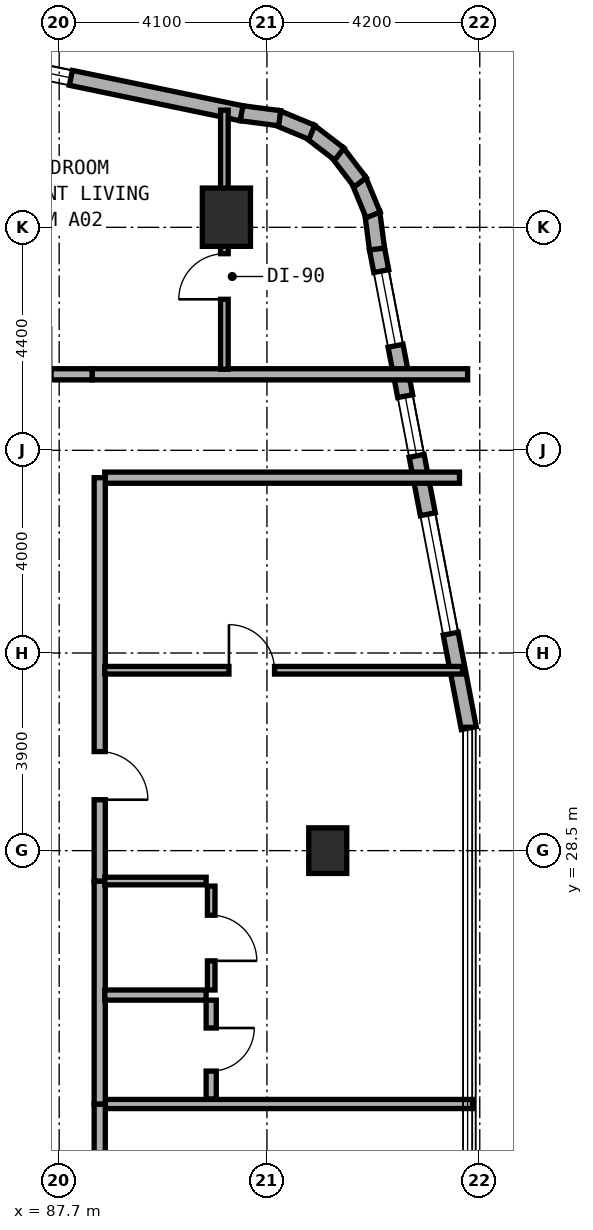
"""IFC4 building model, lengths in metres.
Left out: names, types, materials, properties, quantities, classifications, styles, units other than length and angle.
Written with IfcOpenShell. Run it as: python <this file> out.ifc"""

import sys

from ifc_helpers import new_model, si_unit, direction, frame, frame_2d, origin, origin_2d, place, context, subcontext, project, spatial, rectangle, extrude, element, fill, save


model = new_model("IFC4")
c1 = context("Model", 3, precision=1e-05, world=origin(), true_north=direction((0.0, 1.0)))
c2 = subcontext(c1, "Body", "Model", "MODEL_VIEW")
j1 = project(units=[si_unit("LENGTHUNIT", "METRE"), si_unit("PLANEANGLEUNIT", "RADIAN")], contexts=[c1])
p1 = place(None, origin())
s1 = spatial("IfcSite", under=j1, at=p1, CompositionType="ELEMENT")
p2 = place(p1, origin())
s2 = spatial("IfcBuilding", under=s1, at=p2, CompositionType="ELEMENT")
p3 = place(p2, frame((0.0, 0.0, 69.5)))
s3 = spatial("IfcBuildingStorey", under=s2, at=p3, CompositionType="ELEMENT", Elevation=69.5)
p4 = place(p3, frame((93.0, 28.5, 0.0), z_axis=(0.0, 0.0, 1.0), x_axis=(1.0, 0.0, 0.0)))
e1 = element("IfcColumn", 1, at=p4, inside=s3, PredefinedType="COLUMN", context=c2, shape_type="SweptSolid", body=[
    extrude(rectangle(XDim=0.75, YDim=0.9, at=origin_2d()), origin(), (0.0, 0.0, 1.0), 3.5),
])
p5 = place(p3, frame((91.0, 41.0, 0.0), z_axis=(0.0, 0.0, 1.0), x_axis=(1.0, 0.0, 0.0)))
e2 = element("IfcColumn", 2, at=p5, inside=s3, PredefinedType="COLUMN", context=c2, shape_type="SweptSolid", body=[
    extrude(rectangle(XDim=0.95, YDim=1.15, at=origin_2d()), origin(), (0.0, 0.0, 1.0), 3.5),
])
p6 = place(p3, frame((95.783, 30.918, 0.0), z_axis=(0.0, 0.0, 1.0), x_axis=(-0.188087874316, 0.982152203854, 0.0)))
e3 = element("IfcWall", 3, at=p6, inside=s3, PredefinedType="STANDARD", context=c2, shape_type="SweptSolid", body=[
    extrude(rectangle(XDim=9.634, YDim=0.3, at=frame_2d((4.817, 0.0))), origin(), (0.0, 0.0, 1.0), 3.25),
])
p7 = place(p6, frame((1.897, 0.0, 0.8)))
e4 = element("IfcOpeningElement", 4, at=p7, cuts=e3, PredefinedType="OPENING", context=c2, shape_type="SweptSolid", body=[
    extrude(rectangle(XDim=2.4, YDim=1.6, at=frame_2d((1.2, 0.8))), frame((0.0, 0.16, 0.0), z_axis=(0.0, -1.0, 0.0), x_axis=(1.0, 0.0, 0.0)), (0.0, 0.0, 1.0), 0.32),
])
p8 = place(p6, frame((5.47, 0.0, 0.85)))
e5 = element("IfcOpeningElement", 5, at=p8, cuts=e3, PredefinedType="OPENING", context=c2, shape_type="SweptSolid", body=[
    extrude(rectangle(XDim=1.2, YDim=1.5, at=frame_2d((0.6, 0.75))), frame((0.0, 0.16, 0.0), z_axis=(0.0, -1.0, 0.0), x_axis=(1.0, 0.0, 0.0)), (0.0, 0.0, 1.0), 0.32),
])
p9 = place(p6, frame((7.682, 0.0, 0.85)))
e6 = element("IfcOpeningElement", 6, at=p9, cuts=e3, PredefinedType="OPENING", context=c2, shape_type="SweptSolid", body=[
    extrude(rectangle(XDim=1.5, YDim=1.5, at=frame_2d((0.75, 0.75))), frame((0.0, 0.16, 0.0), z_axis=(0.0, -1.0, 0.0), x_axis=(1.0, 0.0, 0.0)), (0.0, 0.0, 1.0), 0.32),
])
p10 = place(p3, frame((93.972, 40.373, 0.0), z_axis=(0.0, 0.0, 1.0), x_axis=(-0.130255288807, 0.991480488834, 0.0)))
e7 = element("IfcWall", 7, at=p10, inside=s3, PredefinedType="STANDARD", context=c2, shape_type="SweptSolid", body=[
    extrude(rectangle(XDim=0.729, YDim=0.3, at=frame_2d((0.365, 0.0))), origin(), (0.0, 0.0, 1.0), 3.25),
])
p11 = place(p3, frame((93.896, 41.045, 0.0), z_axis=(0.0, 0.0, 1.0), x_axis=(-0.383267045233, 0.923637576129, 0.0)))
e8 = element("IfcWall", 8, at=p11, inside=s3, PredefinedType="STANDARD", context=c2, shape_type="SweptSolid", body=[
    extrude(rectangle(XDim=0.746, YDim=0.3, at=frame_2d((0.373, 0.0))), origin(), (0.0, 0.0, 1.0), 3.25),
])
for number, where, z_axis, x_axis in (
    (9, (93.641, 41.689, 0.0), (0.0, 0.0, 1.0), (-0.609, 0.793, 0.0)),
    (10, (93.229, 42.246, 0.0), (0.0, 0.0, 1.0), (-0.794, 0.608, 0.0)),
):
    element("IfcWall", number, at=place(p3, frame(where, z_axis=z_axis, x_axis=x_axis)), inside=s3, PredefinedType="STANDARD", context=c2, shape_type="SweptSolid", body=[
        extrude(rectangle(XDim=0.746, YDim=0.3, at=frame_2d((0.373, 0.0))), origin(), (0.0, 0.0, 1.0), 3.25),
    ])
p12 = place(p3, frame((92.686, 42.676, 0.0), z_axis=(0.0, 0.0, 1.0), x_axis=(-0.923637576129, 0.383267045233, 0.0)))
e11 = element("IfcWall", 11, at=p12, inside=s3, PredefinedType="STANDARD", context=c2, shape_type="SweptSolid", body=[
    extrude(rectangle(XDim=0.746, YDim=0.3, at=frame_2d((0.373, 0.0))), origin(), (0.0, 0.0, 1.0), 3.25),
])
p13 = place(p3, frame((92.051, 42.953, 0.0), z_axis=(0.0, 0.0, 1.0), x_axis=(-0.991559404866, 0.129653178221, 0.0)))
e12 = element("IfcWall", 12, at=p13, inside=s3, PredefinedType="STANDARD", context=c2, shape_type="SweptSolid", body=[
    extrude(rectangle(XDim=0.764, YDim=0.3, at=frame_2d((0.382, 0.0))), origin(), (0.0, 0.0, 1.0), 3.25),
])
p14 = place(p3, frame((91.298, 43.051, 0.0), z_axis=(0.0, 0.0, 1.0), x_axis=(-0.979120793441, 0.203279295189, 0.0)))
e13 = element("IfcWall", 13, at=p14, inside=s3, PredefinedType="STANDARD", context=c2, shape_type="SweptSolid", body=[
    extrude(rectangle(XDim=8.855, YDim=0.3, at=frame_2d((4.427, 0.0))), origin(), (0.0, 0.0, 1.0), 3.25),
])
p15 = place(p14, frame((3.439, 0.0, 0.8)))
e14 = element("IfcOpeningElement", 14, at=p15, cuts=e13, PredefinedType="OPENING", context=c2, shape_type="SweptSolid", body=[
    extrude(rectangle(XDim=2.4, YDim=1.6, at=frame_2d((1.2, 0.8))), frame((0.0, 0.16, 0.0), z_axis=(0.0, -1.0, 0.0), x_axis=(1.0, 0.0, 0.0)), (0.0, 0.0, 1.0), 0.32),
])
p16 = place(p3, frame((88.35, 37.9, 0.0), z_axis=(0.0, 0.0, 1.0), x_axis=(1.0, 0.0, 0.0)))
e15 = element("IfcWall", 15, at=p16, inside=s3, PredefinedType="SOLIDWALL", context=c2, shape_type="SweptSolid", body=[
    extrude(rectangle(XDim=7.41, YDim=0.22, at=frame_2d((3.705, 0.0))), origin(), (0.0, 0.0, 1.0), 2.865),
])
p17 = place(p3, frame((85.78, 37.9, 0.0), z_axis=(0.0, 0.0, 1.0), x_axis=(1.0, 0.0, 0.0)))
e16 = element("IfcWall", 16, at=p17, inside=s3, PredefinedType="SOLIDWALL", context=c2, shape_type="SweptSolid", body=[
    extrude(rectangle(XDim=2.57, YDim=0.22, at=frame_2d((1.285, 0.0))), origin(), (0.0, 0.0, 1.0), 3.22),
])
p18 = place(p17, frame((0.81, 0.0, 0.0)))
e17 = element("IfcOpeningElement", 17, at=p18, cuts=e16, PredefinedType="OPENING", context=c2, shape_type="SweptSolid", body=[
    extrude(rectangle(XDim=0.95, YDim=2.1, at=frame_2d((0.475, 1.05))), frame((0.0, 0.12, 0.0), z_axis=(0.0, -1.0, 0.0), x_axis=(1.0, 0.0, 0.0)), (0.0, 0.0, 1.0), 0.24),
])
p19 = place(p3, frame((90.96, 38.0, 0.0), z_axis=(0.0, 0.0, 1.0), x_axis=(0.0, 1.0, 0.0)))
e18 = element("IfcWall", 18, at=p19, inside=s3, PredefinedType="PARTITIONING", context=c2, shape_type="SweptSolid", body=[
    extrude(rectangle(XDim=5.113, YDim=0.15, at=frame_2d((2.557, 0.0))), origin(), (0.0, 0.0, 1.0), 2.865),
])
p20 = place(p19, frame((1.38, 0.0, 0.0)))
e19 = element("IfcOpeningElement", 19, at=p20, cuts=e18, PredefinedType="OPENING", context=c2, shape_type="SweptSolid", body=[
    extrude(rectangle(XDim=0.9, YDim=2.1, at=frame_2d((0.45, 1.05))), frame((0.0, 0.085, 0.0), z_axis=(0.0, -1.0, 0.0), x_axis=(1.0, 0.0, 0.0)), (0.0, 0.0, 1.0), 0.17),
])
p21 = place(p3, frame((88.6, 35.86, 0.0), z_axis=(0.0, 0.0, 1.0), x_axis=(1.0, 0.0, 0.0)))
e20 = element("IfcWall", 20, at=p21, inside=s3, PredefinedType="SOLIDWALL", context=c2, shape_type="SweptSolid", body=[
    extrude(rectangle(XDim=7.0, YDim=0.22, at=frame_2d((3.5, 0.0))), origin(), (0.0, 0.0, 1.0), 2.865),
])
p22 = place(p3, frame((88.5, 23.5, 0.0), z_axis=(0.0, 0.0, 1.0), x_axis=(1.0, 0.0, 0.0)))
e21 = element("IfcWall", 21, at=p22, inside=s3, PredefinedType="SOLIDWALL", context=c2, shape_type="SweptSolid", body=[
    extrude(rectangle(XDim=7.36, YDim=0.18, at=frame_2d((3.68, 0.0))), origin(), (0.0, 0.0, 1.0), 2.865),
])
p23 = place(p3, frame((88.5, 18.54, 0.0), z_axis=(0.0, 0.0, 1.0), x_axis=(0.0, 1.0, 0.0)))
e22 = element("IfcWall", 22, at=p23, inside=s3, PredefinedType="SOLIDWALL", context=c2, shape_type="SweptSolid", body=[
    extrude(rectangle(XDim=4.96, YDim=0.22, at=frame_2d((2.48, 0.0))), origin(), (0.0, 0.0, 1.0), 2.725),
])
p24 = place(p23, frame((2.005, 0.0, 0.0)))
e23 = element("IfcOpeningElement", 23, at=p24, cuts=e22, PredefinedType="OPENING", context=c2, shape_type="SweptSolid", body=[
    extrude(rectangle(XDim=0.95, YDim=2.1, at=frame_2d((0.475, 1.05))), frame((0.0, 0.12, 0.0), z_axis=(0.0, -1.0, 0.0), x_axis=(1.0, 0.0, 0.0)), (0.0, 0.0, 1.0), 0.24),
])
p25 = place(p3, frame((88.5, 23.5, 0.0), z_axis=(0.0, 0.0, 1.0), x_axis=(0.0, 1.0, 0.0)))
e24 = element("IfcWall", 24, at=p25, inside=s3, PredefinedType="SOLIDWALL", context=c2, shape_type="SweptSolid", body=[
    extrude(rectangle(XDim=4.4, YDim=0.22, at=frame_2d((2.2, 0.0))), origin(), (0.0, 0.0, 1.0), 3.22),
])
p26 = place(p3, frame((88.5, 27.9, 0.0), z_axis=(0.0, 0.0, 1.0), x_axis=(0.0, 1.0, 0.0)))
e25 = element("IfcWall", 25, at=p26, inside=s3, PredefinedType="SOLIDWALL", context=c2, shape_type="SweptSolid", body=[
    extrude(rectangle(XDim=7.96, YDim=0.22, at=frame_2d((3.98, 0.0))), origin(), (0.0, 0.0, 1.0), 2.725),
])
p27 = place(p26, frame((1.605, 0.0, 0.0)))
e26 = element("IfcOpeningElement", 26, at=p27, cuts=e25, PredefinedType="OPENING", context=c2, shape_type="SweptSolid", body=[
    extrude(rectangle(XDim=0.95, YDim=2.1, at=frame_2d((0.475, 1.05))), frame((0.0, 0.12, 0.0), z_axis=(0.0, -1.0, 0.0), x_axis=(1.0, 0.0, 0.0)), (0.0, 0.0, 1.0), 0.24),
])
p28 = place(p3, frame((88.6, 32.06, 0.0), z_axis=(0.0, 0.0, 1.0), x_axis=(1.0, 0.0, 0.0)))
e27 = element("IfcWall", 27, at=p28, inside=s3, PredefinedType="PARTITIONING", context=c2, shape_type="SweptSolid", body=[
    extrude(rectangle(XDim=7.06, YDim=0.15, at=frame_2d((3.53, 0.0))), origin(), (0.0, 0.0, 1.0), 2.865),
])
p29 = place(p28, frame((2.45, 0.0, 0.0)))
e28 = element("IfcOpeningElement", 28, at=p29, cuts=e27, PredefinedType="OPENING", context=c2, shape_type="SweptSolid", body=[
    extrude(rectangle(XDim=0.9, YDim=2.1, at=frame_2d((0.45, 1.05))), frame((0.0, 0.085, 0.0), z_axis=(0.0, -1.0, 0.0), x_axis=(1.0, 0.0, 0.0)), (0.0, 0.0, 1.0), 0.17),
])
p30 = place(p3, frame((88.6, 25.65, 0.0), z_axis=(0.0, 0.0, 1.0), x_axis=(1.0, 0.0, 0.0)))
e29 = element("IfcWall", 29, at=p30, inside=s3, PredefinedType="PLUMBINGWALL", context=c2, shape_type="SweptSolid", body=[
    extrude(rectangle(XDim=2.0, YDim=0.2, at=frame_2d((1.0, 0.0))), origin(), (0.0, 0.0, 1.0), 3.22),
])
p31 = place(p3, frame((88.6, 27.9, 0.0), z_axis=(0.0, 0.0, 1.0), x_axis=(1.0, 0.0, 0.0)))
e30 = element("IfcWall", 30, at=p31, inside=s3, PredefinedType="PARTITIONING", context=c2, shape_type="SweptSolid", body=[
    extrude(rectangle(XDim=2.0, YDim=0.15, at=frame_2d((1.0, 0.0))), origin(), (0.0, 0.0, 1.0), 3.22),
])
p32 = place(p3, frame((90.7, 23.6, 0.0), z_axis=(0.0, 0.0, 1.0), x_axis=(0.0, 1.0, 0.0)))
e31 = element("IfcWall", 31, at=p32, inside=s3, PredefinedType="PLUMBINGWALL", context=c2, shape_type="SweptSolid", body=[
    extrude(rectangle(XDim=1.95, YDim=0.2, at=frame_2d((0.975, 0.0))), origin(), (0.0, 0.0, 1.0), 3.22),
])
p33 = place(p32, frame((0.55, 0.0, 0.0)))
e32 = element("IfcOpeningElement", 32, at=p33, cuts=e31, PredefinedType="OPENING", context=c2, shape_type="SweptSolid", body=[
    extrude(rectangle(XDim=0.85, YDim=2.1, at=frame_2d((0.425, 1.05))), frame((0.0, 0.11, 0.0), z_axis=(0.0, -1.0, 0.0), x_axis=(1.0, 0.0, 0.0)), (0.0, 0.0, 1.0), 0.22),
])
p34 = place(p3, frame((90.7, 25.75, 0.0), z_axis=(0.0, 0.0, 1.0), x_axis=(0.0, 1.0, 0.0)))
e33 = element("IfcWall", 33, at=p34, inside=s3, PredefinedType="PARTITIONING", context=c2, shape_type="SweptSolid", body=[
    extrude(rectangle(XDim=2.05, YDim=0.15, at=frame_2d((1.025, 0.0))), origin(), (0.0, 0.0, 1.0), 3.22),
])
p35 = place(p34, frame((0.575, 0.0, 0.0)))
e34 = element("IfcOpeningElement", 34, at=p35, cuts=e33, PredefinedType="OPENING", context=c2, shape_type="SweptSolid", body=[
    extrude(rectangle(XDim=0.9, YDim=2.1, at=frame_2d((0.45, 1.05))), frame((0.0, 0.085, 0.0), z_axis=(0.0, -1.0, 0.0), x_axis=(1.0, 0.0, 0.0)), (0.0, 0.0, 1.0), 0.17),
])
p36 = place(p7, origin())
e35 = element("IfcWindow", 35, at=p36, inside=s3, PartitioningType="SINGLE_PANEL", PredefinedType="WINDOW", context=c2, shape_type="SweptSolid", body=[
    extrude(rectangle(XDim=2.4, YDim=1.6, at=frame_2d((1.2, 0.8))), frame((0.0, 0.03, 0.0), z_axis=(0.0, -1.0, 0.0), x_axis=(1.0, 0.0, 0.0)), (0.0, 0.0, 1.0), 0.06),
])
fill(e4, e35)
p37 = place(p8, origin())
e36 = element("IfcWindow", 36, at=p37, inside=s3, PartitioningType="SINGLE_PANEL", PredefinedType="WINDOW", context=c2, shape_type="SweptSolid", body=[
    extrude(rectangle(XDim=1.2, YDim=1.5, at=frame_2d((0.6, 0.75))), frame((0.0, 0.03, 0.0), z_axis=(0.0, -1.0, 0.0), x_axis=(1.0, 0.0, 0.0)), (0.0, 0.0, 1.0), 0.06),
])
fill(e5, e36)
p38 = place(p9, origin())
e37 = element("IfcWindow", 37, at=p38, inside=s3, PartitioningType="SINGLE_PANEL", PredefinedType="WINDOW", context=c2, shape_type="SweptSolid", body=[
    extrude(rectangle(XDim=1.5, YDim=1.5, at=frame_2d((0.75, 0.75))), frame((0.0, 0.03, 0.0), z_axis=(0.0, -1.0, 0.0), x_axis=(1.0, 0.0, 0.0)), (0.0, 0.0, 1.0), 0.06),
])
fill(e6, e37)
p39 = place(p15, origin())
e38 = element("IfcWindow", 38, at=p39, inside=s3, PartitioningType="SINGLE_PANEL", PredefinedType="WINDOW", context=c2, shape_type="SweptSolid", body=[
    extrude(rectangle(XDim=2.4, YDim=1.6, at=frame_2d((1.2, 0.8))), frame((0.0, 0.03, 0.0), z_axis=(0.0, -1.0, 0.0), x_axis=(1.0, 0.0, 0.0)), (0.0, 0.0, 1.0), 0.06),
])
fill(e14, e38)
p40 = place(p20, origin())
e39 = element("IfcDoor", 39, at=p40, inside=s3, OperationType="SINGLE_SWING_LEFT", PredefinedType="DOOR", context=c2, shape_type="SweptSolid", body=[
    extrude(rectangle(XDim=0.9, YDim=2.1, at=frame_2d((0.45, 1.05))), frame((0.0, 0.025, 0.0), z_axis=(0.0, -1.0, 0.0), x_axis=(1.0, 0.0, 0.0)), (0.0, 0.0, 1.0), 0.05),
])
fill(e19, e39)
p41 = place(p27, frame((0.95, 0.0, 0.0), z_axis=(0.0, 0.0, 1.0), x_axis=(-1.0, 0.0, 0.0)))
e40 = element("IfcDoor", 40, at=p41, inside=s3, OperationType="SINGLE_SWING_RIGHT", PredefinedType="DOOR", context=c2, shape_type="SweptSolid", body=[
    extrude(rectangle(XDim=0.95, YDim=2.1, at=frame_2d((0.475, 1.05))), frame((0.0, 0.025, 0.0), z_axis=(0.0, -1.0, 0.0), x_axis=(1.0, 0.0, 0.0)), (0.0, 0.0, 1.0), 0.05),
])
fill(e26, e40)
p42 = place(p29, origin())
e41 = element("IfcDoor", 41, at=p42, inside=s3, OperationType="SINGLE_SWING_LEFT", PredefinedType="DOOR", context=c2, shape_type="SweptSolid", body=[
    extrude(rectangle(XDim=0.9, YDim=2.1, at=frame_2d((0.45, 1.05))), frame((0.0, 0.025, 0.0), z_axis=(0.0, -1.0, 0.0), x_axis=(1.0, 0.0, 0.0)), (0.0, 0.0, 1.0), 0.05),
])
fill(e28, e41)
p43 = place(p33, frame((0.85, 0.0, 0.0), z_axis=(0.0, 0.0, 1.0), x_axis=(-1.0, 0.0, 0.0)))
e42 = element("IfcDoor", 42, at=p43, inside=s3, OperationType="SINGLE_SWING_LEFT", PredefinedType="DOOR", context=c2, shape_type="SweptSolid", body=[
    extrude(rectangle(XDim=0.85, YDim=2.1, at=frame_2d((0.425, 1.05))), frame((0.0, 0.025, 0.0), z_axis=(0.0, -1.0, 0.0), x_axis=(1.0, 0.0, 0.0)), (0.0, 0.0, 1.0), 0.05),
])
fill(e32, e42)
p44 = place(p35, frame((0.9, 0.0, 0.0), z_axis=(0.0, 0.0, 1.0), x_axis=(-1.0, 0.0, 0.0)))
e43 = element("IfcDoor", 43, at=p44, inside=s3, OperationType="SINGLE_SWING_RIGHT", PredefinedType="DOOR", context=c2, shape_type="SweptSolid", body=[
    extrude(rectangle(XDim=0.9, YDim=2.1, at=frame_2d((0.45, 1.05))), frame((0.0, 0.025, 0.0), z_axis=(0.0, -1.0, 0.0), x_axis=(1.0, 0.0, 0.0)), (0.0, 0.0, 1.0), 0.05),
])
fill(e34, e43)
save(model, sys.argv[1])
